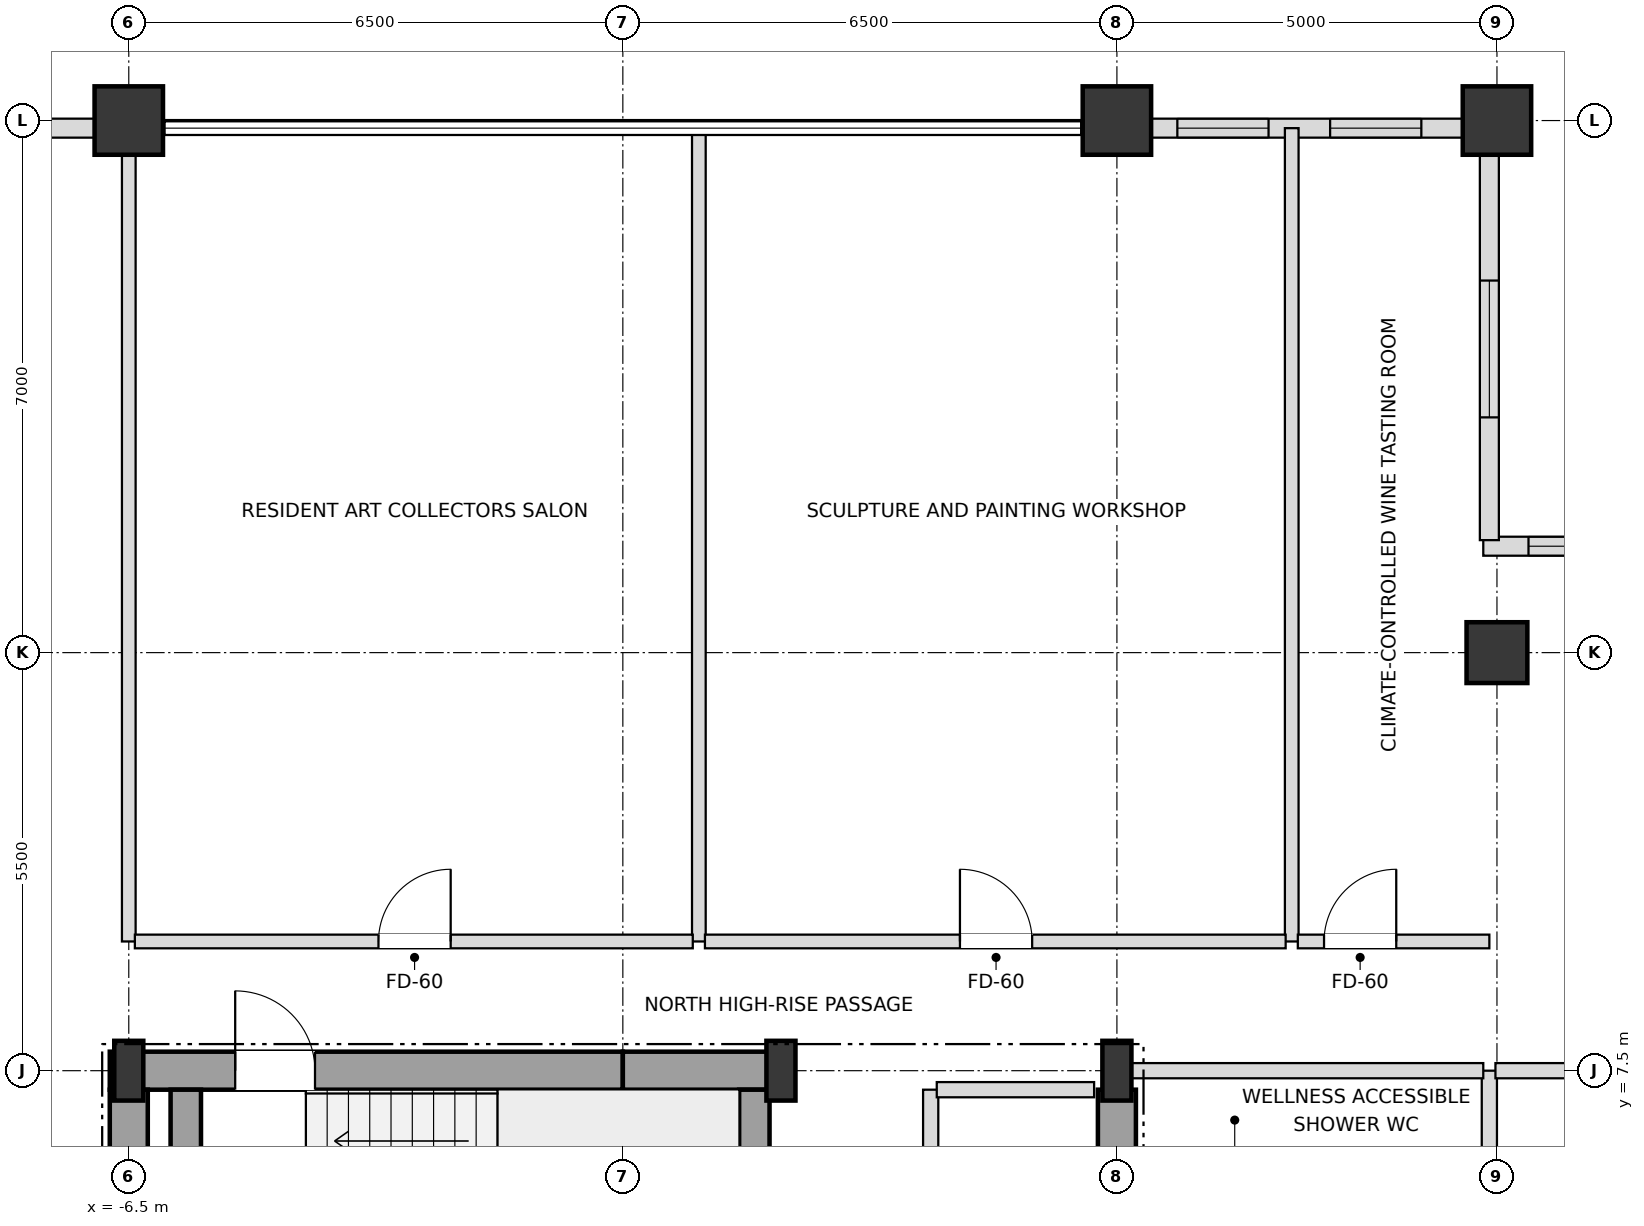
"""IFC4 building model, lengths in metres.
Left out: names, types, materials, properties, quantities, classifications, styles, units other than length and angle.
Written with IfcOpenShell. Run it as: python <this file> out.ifc"""

import sys

from ifc_helpers import new_model, si_unit, direction, frame, frame_2d, origin, origin_2d, place, context, subcontext, project, spatial, rectangle, i_section, extrude, element, fill, save


model = new_model("IFC4")
c1 = context("Model", 3, precision=1e-05, world=origin(), true_north=direction((0.0, 1.0)))
c2 = subcontext(c1, "Body", "Model", "MODEL_VIEW")
j1 = project(units=[si_unit("LENGTHUNIT", "METRE"), si_unit("PLANEANGLEUNIT", "RADIAN")], contexts=[c1])
p1 = place(None, origin())
s1 = spatial("IfcSite", under=j1, at=p1, CompositionType="ELEMENT")
p2 = place(p1, origin())
s2 = spatial("IfcBuilding", under=s1, at=p2, CompositionType="ELEMENT")
p3 = place(p2, frame((0.0, 0.0, 258.3)))
s3 = spatial("IfcBuildingStorey", under=s2, at=p3, CompositionType="ELEMENT", Elevation=258.3)
for number, where, z_axis, x_axis in (
    (1, (-6.5, 7.5, 0.0), (0.0, 0.0, 1.0), (1.0, 0.0, 0.0)),
    (2, (2.08, 7.5, 0.0), (0.0, 0.0, 1.0), (1.0, 0.0, 0.0)),
    (3, (6.5, 7.5, 0.0), (0.0, 0.0, 1.0), (1.0, 0.0, 0.0)),
):
    element("IfcColumn", number, at=place(p3, frame(where, z_axis=z_axis, x_axis=x_axis)), inside=s3, PredefinedType="COLUMN", context=c2, shape_type="SweptSolid", body=[
        extrude(i_section(OverallWidth=0.382, OverallDepth=0.786, WebThickness=0.02, FlangeThickness=0.033, at=origin_2d()), origin(), (0.0, 0.0, 1.0), 3.6),
    ])
for number, where, z_axis, x_axis in (
    (4, (11.5, 20.0, 0.0), (0.0, 0.0, 1.0), (1.0, 0.0, 0.0)),
    (5, (6.5, 20.0, 0.0), (0.0, 0.0, 1.0), (1.0, 0.0, 0.0)),
    (6, (-6.5, 20.0, 0.0), (0.0, 0.0, 1.0), (1.0, 0.0, 0.0)),
):
    element("IfcColumn", number, at=place(p3, frame(where, z_axis=z_axis, x_axis=x_axis)), inside=s3, PredefinedType="USERDEFINED", context=c2, shape_type="SweptSolid", body=[
        extrude(rectangle(XDim=0.9, YDim=0.9, at=origin_2d()), origin(), (0.0, 0.0, 1.0), 3.6),
    ])
p4 = place(p3, frame((11.5, 13.0, 0.0), z_axis=(0.0, 0.0, 1.0), x_axis=(1.0, 0.0, 0.0)))
e7 = element("IfcColumn", 7, at=p4, inside=s3, PredefinedType="COLUMN", context=c2, shape_type="SweptSolid", body=[
    extrude(rectangle(XDim=0.8, YDim=0.8, at=origin_2d()), origin(), (0.0, 0.0, 1.0), 3.6),
])
p5 = place(p3, frame((11.055, 19.9, 0.0), z_axis=(0.0, 0.0, 1.0), x_axis=(-1.0, 0.0, 0.0)))
e8 = element("IfcWall", 8, at=p5, inside=s3, PredefinedType="SOLIDWALL", context=c2, shape_type="SweptSolid", body=[
    extrude(rectangle(XDim=4.11, YDim=0.25, at=frame_2d((2.055, 0.0))), origin(), (0.0, 0.0, 1.0), 2.748),
])
p6 = place(p5, frame((0.55, 0.0, 0.72)))
e9 = element("IfcOpeningElement", 9, at=p6, cuts=e8, PredefinedType="OPENING", context=c2, shape_type="SweptSolid", body=[
    extrude(rectangle(XDim=1.2, YDim=1.68, at=frame_2d((0.6, 0.84))), frame((0.0, 0.135, 0.0), z_axis=(0.0, -1.0, 0.0), x_axis=(1.0, 0.0, 0.0)), (0.0, 0.0, 1.0), 0.27),
])
p7 = place(p5, frame((2.56, 0.0, 0.72)))
e10 = element("IfcOpeningElement", 10, at=p7, cuts=e8, PredefinedType="OPENING", context=c2, shape_type="SweptSolid", body=[
    extrude(rectangle(XDim=1.2, YDim=1.68, at=frame_2d((0.6, 0.84))), frame((0.0, 0.135, 0.0), z_axis=(0.0, -1.0, 0.0), x_axis=(1.0, 0.0, 0.0)), (0.0, 0.0, 1.0), 0.27),
])
p8 = place(p3, frame((-6.945, 19.9, 0.0), z_axis=(0.0, 0.0, 1.0), x_axis=(-1.0, 0.0, 0.0)))
e11 = element("IfcWall", 11, at=p8, inside=s3, PredefinedType="SOLIDWALL", context=c2, shape_type="SweptSolid", body=[
    extrude(rectangle(XDim=4.11, YDim=0.25, at=frame_2d((2.055, 0.0))), origin(), (0.0, 0.0, 1.0), 2.748),
])
p9 = place(p8, frame((1.155, 0.0, 0.72)))
e12 = element("IfcOpeningElement", 12, at=p9, cuts=e11, PredefinedType="OPENING", context=c2, shape_type="SweptSolid", body=[
    extrude(rectangle(XDim=1.8, YDim=1.68, at=frame_2d((0.9, 0.84))), frame((0.0, 0.135, 0.0), z_axis=(0.0, -1.0, 0.0), x_axis=(1.0, 0.0, 0.0)), (0.0, 0.0, 1.0), 0.27),
])
p10 = place(p3, frame((16.98, 14.4, 0.0), z_axis=(0.0, 0.0, 1.0), x_axis=(-1.0, 0.0, 0.0)))
e13 = element("IfcWall", 13, at=p10, inside=s3, PredefinedType="SOLIDWALL", context=c2, shape_type="SweptSolid", body=[
    extrude(rectangle(XDim=5.66, YDim=0.25, at=frame_2d((2.83, 0.0))), origin(), (0.0, 0.0, 1.0), 2.748),
])
p11 = place(p10, frame((0.595, 0.0, 0.72)))
e14 = element("IfcOpeningElement", 14, at=p11, cuts=e13, PredefinedType="OPENING", context=c2, shape_type="SweptSolid", body=[
    extrude(rectangle(XDim=1.8, YDim=1.68, at=frame_2d((0.9, 0.84))), frame((0.0, 0.135, 0.0), z_axis=(0.0, -1.0, 0.0), x_axis=(1.0, 0.0, 0.0)), (0.0, 0.0, 1.0), 0.27),
])
p12 = place(p10, frame((3.265, 0.0, 0.72)))
e15 = element("IfcOpeningElement", 15, at=p12, cuts=e13, PredefinedType="OPENING", context=c2, shape_type="SweptSolid", body=[
    extrude(rectangle(XDim=1.8, YDim=1.68, at=frame_2d((0.9, 0.84))), frame((0.0, 0.135, 0.0), z_axis=(0.0, -1.0, 0.0), x_axis=(1.0, 0.0, 0.0)), (0.0, 0.0, 1.0), 0.27),
])
p13 = place(p3, frame((11.4, 14.48, 0.0), z_axis=(0.0, 0.0, 1.0), x_axis=(0.0, 1.0, 0.0)))
e16 = element("IfcWall", 16, at=p13, inside=s3, PredefinedType="SOLIDWALL", context=c2, shape_type="SweptSolid", body=[
    extrude(rectangle(XDim=5.34, YDim=0.25, at=frame_2d((2.67, 0.0))), origin(), (0.0, 0.0, 1.0), 2.748),
])
p14 = place(p13, frame((1.615, 0.0, 0.72)))
e17 = element("IfcOpeningElement", 17, at=p14, cuts=e16, PredefinedType="OPENING", context=c2, shape_type="SweptSolid", body=[
    extrude(rectangle(XDim=1.8, YDim=1.68, at=frame_2d((0.9, 0.84))), frame((0.0, 0.135, 0.0), z_axis=(0.0, -1.0, 0.0), x_axis=(1.0, 0.0, 0.0)), (0.0, 0.0, 1.0), 0.27),
])
p15 = place(p3, frame((-6.75, 7.5, 0.0), z_axis=(0.0, 0.0, 1.0), x_axis=(1.0, 0.0, 0.0)))
e18 = element("IfcWall", 18, at=p15, inside=s3, PredefinedType="SHEAR", context=c2, shape_type="SweptSolid", body=[
    extrude(rectangle(XDim=6.75, YDim=0.5, at=frame_2d((3.375, 0.0))), origin(), (0.0, 0.0, 1.0), 3.38),
])
p16 = place(p15, frame((1.65, 0.0, 0.0)))
e19 = element("IfcOpeningElement", 19, at=p16, cuts=e18, PredefinedType="OPENING", context=c2, shape_type="SweptSolid", body=[
    extrude(rectangle(XDim=1.05, YDim=2.15, at=frame_2d((0.525, 1.075))), frame((0.0, 0.26, 0.0), z_axis=(0.0, -1.0, 0.0), x_axis=(1.0, 0.0, 0.0)), (0.0, 0.0, 1.0), 0.52),
])
p17 = place(p3, frame((0.0, 7.5, 0.0), z_axis=(0.0, 0.0, 1.0), x_axis=(1.0, 0.0, 0.0)))
e20 = element("IfcWall", 20, at=p17, inside=s3, PredefinedType="SHEAR", context=c2, shape_type="SweptSolid", body=[
    extrude(rectangle(XDim=2.08, YDim=0.5, at=frame_2d((1.04, 0.0))), origin(), (0.0, 0.0, 1.0), 3.38),
])
for number, where, z_axis, x_axis in (
    (21, (-6.5, 3.95, 0.0), (0.0, 0.0, 1.0), (0.0, 1.0, 0.0)),
    (22, (6.5, 3.95, 0.0), (0.0, 0.0, 1.0), (0.0, 1.0, 0.0)),
):
    element("IfcWall", number, at=place(p3, frame(where, z_axis=z_axis, x_axis=x_axis)), inside=s3, PredefinedType="SHEAR", context=c2, shape_type="SweptSolid", body=[
        extrude(rectangle(XDim=3.3, YDim=0.5, at=frame_2d((1.65, 0.0))), origin(), (0.0, 0.0, 1.0), 3.38),
    ])
for number, where, z_axis, x_axis in (
    (23, (1.73, 3.95, 0.0), (0.0, 0.0, 1.0), (0.0, 1.0, 0.0)),
    (24, (-5.75, 3.95, 0.0), (0.0, 0.0, 1.0), (0.0, 1.0, 0.0)),
):
    element("IfcWall", number, at=place(p3, frame(where, z_axis=z_axis, x_axis=x_axis)), inside=s3, PredefinedType="SHEAR", context=c2, shape_type="SweptSolid", body=[
        extrude(rectangle(XDim=3.3, YDim=0.4, at=frame_2d((1.65, 0.0))), origin(), (0.0, 0.0, 1.0), 3.38),
    ])
p18 = place(p3, frame((-6.5, 9.2, 0.0), z_axis=(0.0, 0.0, 1.0), x_axis=(0.0, 1.0, 0.0)))
e25 = element("IfcWall", 25, at=p18, inside=s3, PredefinedType="PARTITIONING", context=c2, shape_type="SweptSolid", body=[
    extrude(rectangle(XDim=10.7, YDim=0.18, at=frame_2d((5.35, 0.0))), origin(), (0.0, 0.0, 1.0), 2.826),
])
p19 = place(p3, frame((1.0, 9.2, 0.0), z_axis=(0.0, 0.0, 1.0), x_axis=(0.0, 1.0, 0.0)))
e26 = element("IfcWall", 26, at=p19, inside=s3, PredefinedType="PARTITIONING", context=c2, shape_type="SweptSolid", body=[
    extrude(rectangle(XDim=10.7, YDim=0.18, at=frame_2d((5.35, 0.0))), origin(), (0.0, 0.0, 1.0), 3.018),
])
p20 = place(p3, frame((4.05, 4.2, 0.0), z_axis=(0.0, 0.0, 1.0), x_axis=(0.0, 1.0, 0.0)))
e27 = element("IfcWall", 27, at=p20, inside=s3, PredefinedType="SOLIDWALL", context=c2, shape_type="SweptSolid", body=[
    extrude(rectangle(XDim=3.05, YDim=0.2, at=frame_2d((1.525, 0.0))), origin(), (0.0, 0.0, 1.0), 3.38),
])
p21 = place(p20, frame((0.975, 0.0, 0.0)))
e28 = element("IfcOpeningElement", 28, at=p21, cuts=e27, PredefinedType="OPENING", context=c2, shape_type="SweptSolid", body=[
    extrude(rectangle(XDim=0.95, YDim=2.15, at=frame_2d((0.475, 1.075))), frame((0.0, 0.11, 0.0), z_axis=(0.0, -1.0, 0.0), x_axis=(1.0, 0.0, 0.0)), (0.0, 0.0, 1.0), 0.22),
])
p22 = place(p3, frame((8.8, 9.2, 0.0), z_axis=(0.0, 0.0, 1.0), x_axis=(0.0, 1.0, 0.0)))
e29 = element("IfcWall", 29, at=p22, inside=s3, PredefinedType="PARTITIONING", context=c2, shape_type="SweptSolid", body=[
    extrude(rectangle(XDim=10.7, YDim=0.18, at=frame_2d((5.35, 0.0))), origin(), (0.0, 0.0, 1.0), 2.826),
])
p23 = place(p3, frame((11.4, 4.5, 0.0), z_axis=(0.0, 0.0, 1.0), x_axis=(0.0, 1.0, 0.0)))
e30 = element("IfcWall", 30, at=p23, inside=s3, PredefinedType="SOLIDWALL", context=c2, shape_type="SweptSolid", body=[
    extrude(rectangle(XDim=3.0, YDim=0.2, at=frame_2d((1.5, 0.0))), origin(), (0.0, 0.0, 1.0), 3.018),
])
p24 = place(p3, frame((4.13, 7.25, 0.0), z_axis=(0.0, 0.0, 1.0), x_axis=(1.0, 0.0, 0.0)))
e31 = element("IfcWall", 31, at=p24, inside=s3, PredefinedType="SOLIDWALL", context=c2, shape_type="SweptSolid", body=[
    extrude(rectangle(XDim=2.07, YDim=0.2, at=frame_2d((1.035, 0.0))), origin(), (0.0, 0.0, 1.0), 3.38),
])
p25 = place(p3, frame((6.5, 7.5, 0.0), z_axis=(0.0, 0.0, 1.0), x_axis=(1.0, 0.0, 0.0)))
e32 = element("IfcWall", 32, at=p25, inside=s3, PredefinedType="SOLIDWALL", context=c2, shape_type="SweptSolid", body=[
    extrude(rectangle(XDim=4.82, YDim=0.2, at=frame_2d((2.41, 0.0))), origin(), (0.0, 0.0, 1.0), 2.826),
])
p26 = place(p3, frame((11.48, 7.5, 0.0), z_axis=(0.0, 0.0, 1.0), x_axis=(1.0, 0.0, 0.0)))
e33 = element("IfcWall", 33, at=p26, inside=s3, PredefinedType="SOLIDWALL", context=c2, shape_type="SweptSolid", body=[
    extrude(rectangle(XDim=5.42, YDim=0.2, at=frame_2d((2.71, 0.0))), origin(), (0.0, 0.0, 1.0), 2.826),
])
p27 = place(p3, frame((-6.42, 9.2, 0.0), z_axis=(0.0, 0.0, 1.0), x_axis=(1.0, 0.0, 0.0)))
e34 = element("IfcWall", 34, at=p27, inside=s3, PredefinedType="PARTITIONING", context=c2, shape_type="SweptSolid", body=[
    extrude(rectangle(XDim=7.34, YDim=0.18, at=frame_2d((3.67, 0.0))), origin(), (0.0, 0.0, 1.0), 3.38),
])
p28 = place(p27, frame((3.205, 0.0, 0.0)))
e35 = element("IfcOpeningElement", 35, at=p28, cuts=e34, PredefinedType="OPENING", context=c2, shape_type="SweptSolid", body=[
    extrude(rectangle(XDim=0.95, YDim=2.15, at=frame_2d((0.475, 1.075))), frame((0.0, 0.1, 0.0), z_axis=(0.0, -1.0, 0.0), x_axis=(1.0, 0.0, 0.0)), (0.0, 0.0, 1.0), 0.2),
])
p29 = place(p3, frame((1.08, 9.2, 0.0), z_axis=(0.0, 0.0, 1.0), x_axis=(1.0, 0.0, 0.0)))
e36 = element("IfcWall", 36, at=p29, inside=s3, PredefinedType="PARTITIONING", context=c2, shape_type="SweptSolid", body=[
    extrude(rectangle(XDim=7.64, YDim=0.18, at=frame_2d((3.82, 0.0))), origin(), (0.0, 0.0, 1.0), 2.826),
])
p30 = place(p29, frame((3.355, 0.0, 0.0)))
e37 = element("IfcOpeningElement", 37, at=p30, cuts=e36, PredefinedType="OPENING", context=c2, shape_type="SweptSolid", body=[
    extrude(rectangle(XDim=0.95, YDim=2.15, at=frame_2d((0.475, 1.075))), frame((0.0, 0.1, 0.0), z_axis=(0.0, -1.0, 0.0), x_axis=(1.0, 0.0, 0.0)), (0.0, 0.0, 1.0), 0.2),
])
p31 = place(p3, frame((8.88, 9.2, 0.0), z_axis=(0.0, 0.0, 1.0), x_axis=(1.0, 0.0, 0.0)))
e38 = element("IfcWall", 38, at=p31, inside=s3, PredefinedType="PARTITIONING", context=c2, shape_type="SweptSolid", body=[
    extrude(rectangle(XDim=2.52, YDim=0.18, at=frame_2d((1.26, 0.0))), origin(), (0.0, 0.0, 1.0), 3.38),
])
p32 = place(p31, frame((0.345, 0.0, 0.0)))
e39 = element("IfcOpeningElement", 39, at=p32, cuts=e38, PredefinedType="OPENING", context=c2, shape_type="SweptSolid", body=[
    extrude(rectangle(XDim=0.95, YDim=2.15, at=frame_2d((0.475, 1.075))), frame((0.0, 0.1, 0.0), z_axis=(0.0, -1.0, 0.0), x_axis=(1.0, 0.0, 0.0)), (0.0, 0.0, 1.0), 0.2),
])
p33 = place(p6, origin())
e40 = element("IfcWindow", 40, at=p33, inside=s3, PartitioningType="SINGLE_PANEL", PredefinedType="WINDOW", context=c2, shape_type="SweptSolid", body=[
    extrude(rectangle(XDim=1.2, YDim=1.68, at=frame_2d((0.6, 0.84))), frame((0.0, 0.03, 0.0), z_axis=(0.0, -1.0, 0.0), x_axis=(1.0, 0.0, 0.0)), (0.0, 0.0, 1.0), 0.06),
])
fill(e9, e40)
p34 = place(p7, origin())
e41 = element("IfcWindow", 41, at=p34, inside=s3, PartitioningType="SINGLE_PANEL", PredefinedType="WINDOW", context=c2, shape_type="SweptSolid", body=[
    extrude(rectangle(XDim=1.2, YDim=1.68, at=frame_2d((0.6, 0.84))), frame((0.0, 0.03, 0.0), z_axis=(0.0, -1.0, 0.0), x_axis=(1.0, 0.0, 0.0)), (0.0, 0.0, 1.0), 0.06),
])
fill(e10, e41)
p35 = place(p12, origin())
e42 = element("IfcWindow", 42, at=p35, inside=s3, PartitioningType="SINGLE_PANEL", PredefinedType="WINDOW", context=c2, shape_type="SweptSolid", body=[
    extrude(rectangle(XDim=1.8, YDim=1.68, at=frame_2d((0.9, 0.84))), frame((0.0, 0.03, 0.0), z_axis=(0.0, -1.0, 0.0), x_axis=(1.0, 0.0, 0.0)), (0.0, 0.0, 1.0), 0.06),
])
fill(e15, e42)
p36 = place(p14, origin())
e43 = element("IfcWindow", 43, at=p36, inside=s3, PartitioningType="SINGLE_PANEL", PredefinedType="WINDOW", context=c2, shape_type="SweptSolid", body=[
    extrude(rectangle(XDim=1.8, YDim=1.68, at=frame_2d((0.9, 0.84))), frame((0.0, 0.03, 0.0), z_axis=(0.0, -1.0, 0.0), x_axis=(1.0, 0.0, 0.0)), (0.0, 0.0, 1.0), 0.06),
])
fill(e17, e43)
p37 = place(p16, origin())
e44 = element("IfcDoor", 44, at=p37, inside=s3, OperationType="SINGLE_SWING_LEFT", PredefinedType="DOOR", context=c2, shape_type="SweptSolid", body=[
    extrude(rectangle(XDim=1.05, YDim=2.15, at=frame_2d((0.525, 1.075))), frame((0.0, 0.025, 0.0), z_axis=(0.0, -1.0, 0.0), x_axis=(1.0, 0.0, 0.0)), (0.0, 0.0, 1.0), 0.05),
])
fill(e19, e44)
p38 = place(p28, origin())
e45 = element("IfcDoor", 45, at=p38, inside=s3, OperationType="SINGLE_SWING_RIGHT", PredefinedType="DOOR", context=c2, shape_type="SweptSolid", body=[
    extrude(rectangle(XDim=0.95, YDim=2.15, at=frame_2d((0.475, 1.075))), frame((0.0, 0.025, 0.0), z_axis=(0.0, -1.0, 0.0), x_axis=(1.0, 0.0, 0.0)), (0.0, 0.0, 1.0), 0.05),
])
fill(e35, e45)
p39 = place(p30, origin())
e46 = element("IfcDoor", 46, at=p39, inside=s3, OperationType="SINGLE_SWING_LEFT", PredefinedType="DOOR", context=c2, shape_type="SweptSolid", body=[
    extrude(rectangle(XDim=0.95, YDim=2.15, at=frame_2d((0.475, 1.075))), frame((0.0, 0.025, 0.0), z_axis=(0.0, -1.0, 0.0), x_axis=(1.0, 0.0, 0.0)), (0.0, 0.0, 1.0), 0.05),
])
fill(e37, e46)
p40 = place(p32, origin())
e47 = element("IfcDoor", 47, at=p40, inside=s3, OperationType="SINGLE_SWING_RIGHT", PredefinedType="DOOR", context=c2, shape_type="SweptSolid", body=[
    extrude(rectangle(XDim=0.95, YDim=2.15, at=frame_2d((0.475, 1.075))), frame((0.0, 0.025, 0.0), z_axis=(0.0, -1.0, 0.0), x_axis=(1.0, 0.0, 0.0)), (0.0, 0.0, 1.0), 0.05),
])
fill(e39, e47)
save(model, sys.argv[1])
